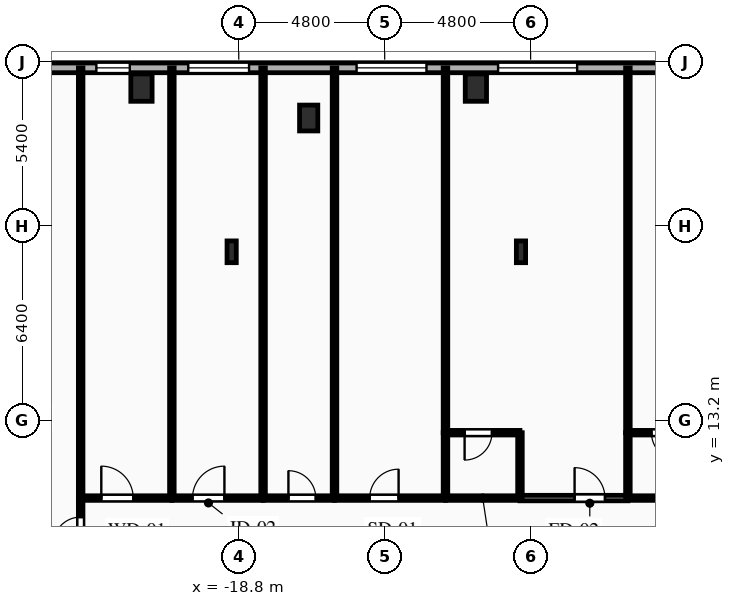
"""IFC4 building model, lengths in metres.
Left out: names, types, materials, properties, quantities, classifications, styles, units other than length and angle.
Written with IfcOpenShell. Run it as: python <this file> out.ifc"""

import sys

from ifc_helpers import new_model, si_unit, direction, frame, frame_2d, origin, origin_2d, place, context, subcontext, project, spatial, rectangle, i_section, extrude, element, fill, save


model = new_model("IFC4")
c1 = context("Model", 3, precision=1e-05, world=origin(), true_north=direction((0.0, 1.0)))
c2 = subcontext(c1, "Body", "Model", "MODEL_VIEW")
j1 = project(units=[si_unit("LENGTHUNIT", "METRE"), si_unit("PLANEANGLEUNIT", "RADIAN")], contexts=[c1])
p1 = place(None, origin())
s1 = spatial("IfcSite", under=j1, at=p1, CompositionType="ELEMENT")
p2 = place(p1, origin())
s2 = spatial("IfcBuilding", under=s1, at=p2, CompositionType="ELEMENT")
p3 = place(p2, frame((0.0, 0.0, 22.5)))
s3 = spatial("IfcBuildingStorey", under=s2, at=p3, CompositionType="ELEMENT", Elevation=22.5)
for number, where, z_axis, x_axis in (
    (1, (-22.0, 24.15, 0.0), (0.0, 0.0, 1.0), (1.0, 0.0, 0.0)),
    (2, (-11.0, 24.15, 0.0), (0.0, 0.0, 1.0), (1.0, 0.0, 0.0)),
):
    element("IfcColumn", number, at=place(p3, frame(where, z_axis=z_axis, x_axis=x_axis)), inside=s3, PredefinedType="COLUMN", context=c2, shape_type="SweptSolid", body=[
        extrude(rectangle(XDim=0.7, YDim=0.9, at=origin_2d()), origin(), (0.0, 0.0, 1.0), 4.5),
    ])
p4 = place(p3, frame((-16.5, 23.15, 0.0), z_axis=(0.0, 0.0, 1.0), x_axis=(1.0, 0.0, 0.0)))
e3 = element("IfcColumn", 3, at=p4, inside=s3, PredefinedType="PILASTER", context=c2, shape_type="SweptSolid", body=[
    extrude(rectangle(XDim=0.6, YDim=0.85, at=origin_2d()), origin(), (0.0, 0.0, 1.0), 4.5),
])
for number, where, z_axis, x_axis in (
    (4, (-9.517, 18.75, 0.0), (0.0, 0.0, 1.0), (1.0, 0.0, 0.0)),
    (5, (-19.033, 18.75, 0.0), (0.0, 0.0, 1.0), (1.0, 0.0, 0.0)),
):
    element("IfcColumn", number, at=place(p3, frame(where, z_axis=z_axis, x_axis=x_axis)), inside=s3, PredefinedType="COLUMN", context=c2, shape_type="SweptSolid", body=[
        extrude(i_section(OverallWidth=0.304, OverallDepth=0.716, WebThickness=0.021, FlangeThickness=0.04, FilletRadius=0.027, at=origin_2d()), origin(), (0.0, 0.0, 1.0), 4.5),
    ])
p5 = place(p3, frame((-36.8, 24.8, 0.0), z_axis=(0.0, 0.0, 1.0), x_axis=(1.0, 0.0, 0.0)))
e6 = element("IfcWall", 6, at=p5, inside=s3, PredefinedType="SOLIDWALL", context=c2, shape_type="SweptSolid", body=[
    extrude(rectangle(XDim=73.6, YDim=0.32, at=frame_2d((36.8, 0.0))), origin(), (0.0, 0.0, 1.0), 4.16),
])
p6 = place(p5, frame((1.079, 0.0, 0.85)))
e7 = element("IfcOpeningElement", 7, at=p6, cuts=e6, PredefinedType="OPENING", context=c2, shape_type="SweptSolid", body=[
    extrude(rectangle(XDim=2.3, YDim=2.4, at=frame_2d((1.15, 1.2))), frame((0.0, 0.17, 0.0), z_axis=(0.0, -1.0, 0.0), x_axis=(1.0, 0.0, 0.0)), (0.0, 0.0, 1.0), 0.34),
])
p7 = place(p5, frame((8.431, 0.0, 0.85)))
e8 = element("IfcOpeningElement", 8, at=p7, cuts=e6, PredefinedType="OPENING", context=c2, shape_type="SweptSolid", body=[
    extrude(rectangle(XDim=2.6, YDim=2.4, at=frame_2d((1.3, 1.2))), frame((0.0, 0.17, 0.0), z_axis=(0.0, -1.0, 0.0), x_axis=(1.0, 0.0, 0.0)), (0.0, 0.0, 1.0), 0.34),
])
p8 = place(p5, frame((13.316, 0.0, 0.85)))
e9 = element("IfcOpeningElement", 9, at=p8, cuts=e6, PredefinedType="OPENING", context=c2, shape_type="SweptSolid", body=[
    extrude(rectangle(XDim=1.1, YDim=1.85, at=frame_2d((0.55, 0.925))), frame((0.0, 0.17, 0.0), z_axis=(0.0, -1.0, 0.0), x_axis=(1.0, 0.0, 0.0)), (0.0, 0.0, 1.0), 0.34),
])
p9 = place(p5, frame((16.339, 0.0, 0.85)))
e10 = element("IfcOpeningElement", 10, at=p9, cuts=e6, PredefinedType="OPENING", context=c2, shape_type="SweptSolid", body=[
    extrude(rectangle(XDim=2.0, YDim=2.4, at=frame_2d((1.0, 1.2))), frame((0.0, 0.17, 0.0), z_axis=(0.0, -1.0, 0.0), x_axis=(1.0, 0.0, 0.0)), (0.0, 0.0, 1.0), 0.34),
])
p10 = place(p5, frame((21.875, 0.0, 0.85)))
e11 = element("IfcOpeningElement", 11, at=p10, cuts=e6, PredefinedType="OPENING", context=c2, shape_type="SweptSolid", body=[
    extrude(rectangle(XDim=2.3, YDim=2.4, at=frame_2d((1.15, 1.2))), frame((0.0, 0.17, 0.0), z_axis=(0.0, -1.0, 0.0), x_axis=(1.0, 0.0, 0.0)), (0.0, 0.0, 1.0), 0.34),
])
p11 = place(p5, frame((26.53, 0.0, 0.85)))
e12 = element("IfcOpeningElement", 12, at=p11, cuts=e6, PredefinedType="OPENING", context=c2, shape_type="SweptSolid", body=[
    extrude(rectangle(XDim=2.6, YDim=2.4, at=frame_2d((1.3, 1.2))), frame((0.0, 0.17, 0.0), z_axis=(0.0, -1.0, 0.0), x_axis=(1.0, 0.0, 0.0)), (0.0, 0.0, 1.0), 0.34),
])
p12 = place(p5, frame((32.537, 0.0, 0.85)))
e13 = element("IfcOpeningElement", 13, at=p12, cuts=e6, PredefinedType="OPENING", context=c2, shape_type="SweptSolid", body=[
    extrude(rectangle(XDim=2.6, YDim=2.4, at=frame_2d((1.3, 1.2))), frame((0.0, 0.17, 0.0), z_axis=(0.0, -1.0, 0.0), x_axis=(1.0, 0.0, 0.0)), (0.0, 0.0, 1.0), 0.34),
])
p13 = place(p5, frame((38.543, 0.0, 0.85)))
e14 = element("IfcOpeningElement", 14, at=p13, cuts=e6, PredefinedType="OPENING", context=c2, shape_type="SweptSolid", body=[
    extrude(rectangle(XDim=2.6, YDim=2.4, at=frame_2d((1.3, 1.2))), frame((0.0, 0.17, 0.0), z_axis=(0.0, -1.0, 0.0), x_axis=(1.0, 0.0, 0.0)), (0.0, 0.0, 1.0), 0.34),
])
p14 = place(p5, frame((44.55, 0.0, 0.85)))
e15 = element("IfcOpeningElement", 15, at=p14, cuts=e6, PredefinedType="OPENING", context=c2, shape_type="SweptSolid", body=[
    extrude(rectangle(XDim=2.6, YDim=2.4, at=frame_2d((1.3, 1.2))), frame((0.0, 0.17, 0.0), z_axis=(0.0, -1.0, 0.0), x_axis=(1.0, 0.0, 0.0)), (0.0, 0.0, 1.0), 0.34),
])
p15 = place(p5, frame((50.556, 0.0, 0.85)))
e16 = element("IfcOpeningElement", 16, at=p15, cuts=e6, PredefinedType="OPENING", context=c2, shape_type="SweptSolid", body=[
    extrude(rectangle(XDim=2.6, YDim=2.4, at=frame_2d((1.3, 1.2))), frame((0.0, 0.17, 0.0), z_axis=(0.0, -1.0, 0.0), x_axis=(1.0, 0.0, 0.0)), (0.0, 0.0, 1.0), 0.34),
])
p16 = place(p5, frame((55.341, 0.0, 0.85)))
e17 = element("IfcOpeningElement", 17, at=p16, cuts=e6, PredefinedType="OPENING", context=c2, shape_type="SweptSolid", body=[
    extrude(rectangle(XDim=2.0, YDim=2.4, at=frame_2d((1.0, 1.2))), frame((0.0, 0.17, 0.0), z_axis=(0.0, -1.0, 0.0), x_axis=(1.0, 0.0, 0.0)), (0.0, 0.0, 1.0), 0.34),
])
p17 = place(p5, frame((59.16, 0.0, 0.85)))
e18 = element("IfcOpeningElement", 18, at=p17, cuts=e6, PredefinedType="OPENING", context=c2, shape_type="SweptSolid", body=[
    extrude(rectangle(XDim=1.1, YDim=1.85, at=frame_2d((0.55, 0.925))), frame((0.0, 0.17, 0.0), z_axis=(0.0, -1.0, 0.0), x_axis=(1.0, 0.0, 0.0)), (0.0, 0.0, 1.0), 0.34),
])
p18 = place(p5, frame((62.649, 0.0, 0.85)))
e19 = element("IfcOpeningElement", 19, at=p18, cuts=e6, PredefinedType="OPENING", context=c2, shape_type="SweptSolid", body=[
    extrude(rectangle(XDim=2.6, YDim=2.4, at=frame_2d((1.3, 1.2))), frame((0.0, 0.17, 0.0), z_axis=(0.0, -1.0, 0.0), x_axis=(1.0, 0.0, 0.0)), (0.0, 0.0, 1.0), 0.34),
])
p19 = place(p5, frame((70.301, 0.0, 0.85)))
e20 = element("IfcOpeningElement", 20, at=p19, cuts=e6, PredefinedType="OPENING", context=c2, shape_type="SweptSolid", body=[
    extrude(rectangle(XDim=2.3, YDim=2.4, at=frame_2d((1.15, 1.2))), frame((0.0, 0.17, 0.0), z_axis=(0.0, -1.0, 0.0), x_axis=(1.0, 0.0, 0.0)), (0.0, 0.0, 1.0), 0.34),
])
p20 = place(p3, frame((-24.0, 8.5, 0.0), z_axis=(0.0, 0.0, 1.0), x_axis=(0.0, 1.0, 0.0)))
e21 = element("IfcWall", 21, at=p20, inside=s3, PredefinedType="PARTITIONING", context=c2, shape_type="SweptSolid", body=[
    extrude(rectangle(XDim=2.15, YDim=0.15, at=frame_2d((1.075, 0.0))), origin(), (0.0, 0.0, 1.0), 4.16),
])
p21 = place(p20, frame((0.625, 0.0, 0.0)))
e22 = element("IfcOpeningElement", 22, at=p21, cuts=e21, PredefinedType="OPENING", context=c2, shape_type="SweptSolid", body=[
    extrude(rectangle(XDim=0.9, YDim=2.1, at=frame_2d((0.45, 1.05))), frame((0.0, 0.085, 0.0), z_axis=(0.0, -1.0, 0.0), x_axis=(1.0, 0.0, 0.0)), (0.0, 0.0, 1.0), 0.17),
])
p22 = place(p3, frame((-24.0, 10.65, 0.0), z_axis=(0.0, 0.0, 1.0), x_axis=(1.0, 0.0, 0.0)))
e23 = element("IfcWall", 23, at=p22, inside=s3, PredefinedType="PARTITIONING", context=c2, shape_type="SweptSolid", body=[
    extrude(rectangle(XDim=3.0, YDim=0.15, at=frame_2d((1.5, 0.0))), origin(), (0.0, 0.0, 1.0), 4.16),
])
p23 = place(p22, frame((0.679, 0.0, 0.0)))
e24 = element("IfcOpeningElement", 24, at=p23, cuts=e23, PredefinedType="OPENING", context=c2, shape_type="SweptSolid", body=[
    extrude(rectangle(XDim=1.05, YDim=2.15, at=frame_2d((0.525, 1.075))), frame((0.0, 0.085, 0.0), z_axis=(0.0, -1.0, 0.0), x_axis=(1.0, 0.0, 0.0)), (0.0, 0.0, 1.0), 0.17),
])
p24 = place(p3, frame((-21.0, 10.65, 0.0), z_axis=(0.0, 0.0, 1.0), x_axis=(1.0, 0.0, 0.0)))
e25 = element("IfcWall", 25, at=p24, inside=s3, PredefinedType="PARTITIONING", context=c2, shape_type="SweptSolid", body=[
    extrude(rectangle(XDim=3.0, YDim=0.15, at=frame_2d((1.5, 0.0))), origin(), (0.0, 0.0, 1.0), 4.16),
])
p25 = place(p24, frame((0.679, 0.0, 0.0)))
e26 = element("IfcOpeningElement", 26, at=p25, cuts=e25, PredefinedType="OPENING", context=c2, shape_type="SweptSolid", body=[
    extrude(rectangle(XDim=1.05, YDim=2.15, at=frame_2d((0.525, 1.075))), frame((0.0, 0.085, 0.0), z_axis=(0.0, -1.0, 0.0), x_axis=(1.0, 0.0, 0.0)), (0.0, 0.0, 1.0), 0.17),
])
p26 = place(p3, frame((-18.0, 10.65, 0.0), z_axis=(0.0, 0.0, 1.0), x_axis=(1.0, 0.0, 0.0)))
e27 = element("IfcWall", 27, at=p26, inside=s3, PredefinedType="PLUMBINGWALL", context=c2, shape_type="SweptSolid", body=[
    extrude(rectangle(XDim=2.35, YDim=0.15, at=frame_2d((1.175, 0.0))), origin(), (0.0, 0.0, 1.0), 4.16),
])
p27 = place(p26, frame((0.834, 0.0, 0.0)))
e28 = element("IfcOpeningElement", 28, at=p27, cuts=e27, PredefinedType="OPENING", context=c2, shape_type="SweptSolid", body=[
    extrude(rectangle(XDim=0.9, YDim=2.1, at=frame_2d((0.45, 1.05))), frame((0.0, 0.085, 0.0), z_axis=(0.0, -1.0, 0.0), x_axis=(1.0, 0.0, 0.0)), (0.0, 0.0, 1.0), 0.17),
])
p28 = place(p3, frame((-15.65, 10.65, 0.0), z_axis=(0.0, 0.0, 1.0), x_axis=(1.0, 0.0, 0.0)))
e29 = element("IfcWall", 29, at=p28, inside=s3, PredefinedType="PARTITIONING", context=c2, shape_type="SweptSolid", body=[
    extrude(rectangle(XDim=3.65, YDim=0.15, at=frame_2d((1.825, 0.0))), origin(), (0.0, 0.0, 1.0), 4.16),
])
p29 = place(p28, frame((1.157, 0.0, 0.0)))
e30 = element("IfcOpeningElement", 30, at=p29, cuts=e29, PredefinedType="OPENING", context=c2, shape_type="SweptSolid", body=[
    extrude(rectangle(XDim=0.95, YDim=2.1, at=frame_2d((0.475, 1.05))), frame((0.0, 0.085, 0.0), z_axis=(0.0, -1.0, 0.0), x_axis=(1.0, 0.0, 0.0)), (0.0, 0.0, 1.0), 0.17),
])
p30 = place(p3, frame((-9.55, 10.65, 0.0), z_axis=(0.0, 0.0, 1.0), x_axis=(1.0, 0.0, 0.0)))
e31 = element("IfcWall", 31, at=p30, inside=s3, PredefinedType="PARTITIONING", context=c2, shape_type="SweptSolid", body=[
    extrude(rectangle(XDim=3.55, YDim=0.18, at=frame_2d((1.775, 0.0))), origin(), (0.0, 0.0, 1.0), 4.16),
])
p31 = place(p30, frame((1.796, 0.0, 0.0)))
e32 = element("IfcOpeningElement", 32, at=p31, cuts=e31, PredefinedType="OPENING", context=c2, shape_type="SweptSolid", body=[
    extrude(rectangle(XDim=1.0, YDim=2.15, at=frame_2d((0.5, 1.075))), frame((0.0, 0.1, 0.0), z_axis=(0.0, -1.0, 0.0), x_axis=(1.0, 0.0, 0.0)), (0.0, 0.0, 1.0), 0.2),
])
for number, where, z_axis, x_axis in (
    (33, (-12.0, 10.65, 0.0), (0.0, 0.0, 1.0), (1.0, 0.0, 0.0)),
    (34, (-6.0, 10.65, 0.0), (0.0, 0.0, 1.0), (1.0, 0.0, 0.0)),
):
    element("IfcWall", number, at=place(p3, frame(where, z_axis=z_axis, x_axis=x_axis)), inside=s3, PredefinedType="PLUMBINGWALL", context=c2, shape_type="SweptSolid", body=[
        extrude(rectangle(XDim=2.45, YDim=0.15, at=frame_2d((1.225, 0.0))), origin(), (0.0, 0.0, 1.0), 4.16),
    ])
for number, where, z_axis, x_axis in (
    (35, (-24.0, 24.8, 0.0), (0.0, 0.0, 1.0), (0.0, -1.0, 0.0)),
    (36, (-21.0, 24.8, 0.0), (0.0, 0.0, 1.0), (0.0, -1.0, 0.0)),
):
    element("IfcWall", number, at=place(p3, frame(where, z_axis=z_axis, x_axis=x_axis)), inside=s3, PredefinedType="PARTITIONING", context=c2, shape_type="SweptSolid", body=[
        extrude(rectangle(XDim=14.15, YDim=0.15, at=frame_2d((7.075, 0.0))), origin(), (0.0, 0.0, 1.0), 4.16),
    ])
for number, where, z_axis, x_axis in (
    (37, (-18.0, 24.8, 0.0), (0.0, 0.0, 1.0), (0.0, -1.0, 0.0)),
    (38, (-15.65, 24.8, 0.0), (0.0, 0.0, 1.0), (0.0, -1.0, 0.0)),
):
    element("IfcWall", number, at=place(p3, frame(where, z_axis=z_axis, x_axis=x_axis)), inside=s3, PredefinedType="PLUMBINGWALL", context=c2, shape_type="SweptSolid", body=[
        extrude(rectangle(XDim=14.15, YDim=0.15, at=frame_2d((7.075, 0.0))), origin(), (0.0, 0.0, 1.0), 4.16),
    ])
p32 = place(p3, frame((-12.0, 24.8, 0.0), z_axis=(0.0, 0.0, 1.0), x_axis=(0.0, -1.0, 0.0)))
e39 = element("IfcWall", 39, at=p32, inside=s3, PredefinedType="PARTITIONING", context=c2, shape_type="SweptSolid", body=[
    extrude(rectangle(XDim=12.0, YDim=0.15, at=frame_2d((6.0, 0.0))), origin(), (0.0, 0.0, 1.0), 4.16),
])
p33 = place(p3, frame((-12.0, 12.8, 0.0), z_axis=(0.0, 0.0, 1.0), x_axis=(0.0, -1.0, 0.0)))
e40 = element("IfcWall", 40, at=p33, inside=s3, PredefinedType="PLUMBINGWALL", context=c2, shape_type="SweptSolid", body=[
    extrude(rectangle(XDim=2.15, YDim=0.15, at=frame_2d((1.075, 0.0))), origin(), (0.0, 0.0, 1.0), 4.16),
])
p34 = place(p3, frame((-9.55, 12.8, 0.0), z_axis=(0.0, 0.0, 1.0), x_axis=(-1.0, 0.0, 0.0)))
e41 = element("IfcWall", 41, at=p34, inside=s3, PredefinedType="PLUMBINGWALL", context=c2, shape_type="SweptSolid", body=[
    extrude(rectangle(XDim=2.45, YDim=0.15, at=frame_2d((1.225, 0.0))), origin(), (0.0, 0.0, 1.0), 4.16),
])
p35 = place(p34, frame((0.921, 0.0, 0.0)))
e42 = element("IfcOpeningElement", 42, at=p35, cuts=e41, PredefinedType="OPENING", context=c2, shape_type="SweptSolid", body=[
    extrude(rectangle(XDim=0.9, YDim=2.1, at=frame_2d((0.45, 1.05))), frame((0.0, 0.085, 0.0), z_axis=(0.0, -1.0, 0.0), x_axis=(1.0, 0.0, 0.0)), (0.0, 0.0, 1.0), 0.17),
])
p36 = place(p3, frame((-9.55, 10.65, 0.0), z_axis=(0.0, 0.0, 1.0), x_axis=(0.0, 1.0, 0.0)))
e43 = element("IfcWall", 43, at=p36, inside=s3, PredefinedType="PLUMBINGWALL", context=c2, shape_type="SweptSolid", body=[
    extrude(rectangle(XDim=2.15, YDim=0.15, at=frame_2d((1.075, 0.0))), origin(), (0.0, 0.0, 1.0), 3.645),
])
p37 = place(p3, frame((-6.0, 24.8, 0.0), z_axis=(0.0, 0.0, 1.0), x_axis=(0.0, -1.0, 0.0)))
e44 = element("IfcWall", 44, at=p37, inside=s3, PredefinedType="PARTITIONING", context=c2, shape_type="SweptSolid", body=[
    extrude(rectangle(XDim=12.0, YDim=0.15, at=frame_2d((6.0, 0.0))), origin(), (0.0, 0.0, 1.0), 4.16),
])
p38 = place(p3, frame((-6.0, 12.8, 0.0), z_axis=(0.0, 0.0, 1.0), x_axis=(0.0, -1.0, 0.0)))
e45 = element("IfcWall", 45, at=p38, inside=s3, PredefinedType="PLUMBINGWALL", context=c2, shape_type="SweptSolid", body=[
    extrude(rectangle(XDim=2.15, YDim=0.15, at=frame_2d((1.075, 0.0))), origin(), (0.0, 0.0, 1.0), 4.16),
])
p39 = place(p3, frame((-3.55, 12.8, 0.0), z_axis=(0.0, 0.0, 1.0), x_axis=(-1.0, 0.0, 0.0)))
e46 = element("IfcWall", 46, at=p39, inside=s3, PredefinedType="PLUMBINGWALL", context=c2, shape_type="SweptSolid", body=[
    extrude(rectangle(XDim=2.45, YDim=0.15, at=frame_2d((1.225, 0.0))), origin(), (0.0, 0.0, 1.0), 4.16),
])
p40 = place(p39, frame((0.775, 0.0, 0.0)))
e47 = element("IfcOpeningElement", 47, at=p40, cuts=e46, PredefinedType="OPENING", context=c2, shape_type="SweptSolid", body=[
    extrude(rectangle(XDim=0.9, YDim=2.1, at=frame_2d((0.45, 1.05))), frame((0.0, 0.085, 0.0), z_axis=(0.0, -1.0, 0.0), x_axis=(1.0, 0.0, 0.0)), (0.0, 0.0, 1.0), 0.17),
])
p41 = place(p8, origin())
e48 = element("IfcWindow", 48, at=p41, inside=s3, PartitioningType="SINGLE_PANEL", PredefinedType="WINDOW", context=c2, shape_type="SweptSolid", body=[
    extrude(rectangle(XDim=1.1, YDim=1.85, at=frame_2d((0.55, 0.925))), frame((0.0, 0.03, 0.0), z_axis=(0.0, -1.0, 0.0), x_axis=(1.0, 0.0, 0.0)), (0.0, 0.0, 1.0), 0.06),
])
fill(e9, e48)
p42 = place(p9, origin())
e49 = element("IfcWindow", 49, at=p42, inside=s3, PartitioningType="SINGLE_PANEL", PredefinedType="WINDOW", context=c2, shape_type="SweptSolid", body=[
    extrude(rectangle(XDim=2.0, YDim=2.4, at=frame_2d((1.0, 1.2))), frame((0.0, 0.03, 0.0), z_axis=(0.0, -1.0, 0.0), x_axis=(1.0, 0.0, 0.0)), (0.0, 0.0, 1.0), 0.06),
])
fill(e10, e49)
p43 = place(p10, origin())
e50 = element("IfcWindow", 50, at=p43, inside=s3, PartitioningType="SINGLE_PANEL", PredefinedType="WINDOW", context=c2, shape_type="SweptSolid", body=[
    extrude(rectangle(XDim=2.3, YDim=2.4, at=frame_2d((1.15, 1.2))), frame((0.0, 0.03, 0.0), z_axis=(0.0, -1.0, 0.0), x_axis=(1.0, 0.0, 0.0)), (0.0, 0.0, 1.0), 0.06),
])
fill(e11, e50)
p44 = place(p11, origin())
e51 = element("IfcWindow", 51, at=p44, inside=s3, PartitioningType="SINGLE_PANEL", PredefinedType="WINDOW", context=c2, shape_type="SweptSolid", body=[
    extrude(rectangle(XDim=2.6, YDim=2.4, at=frame_2d((1.3, 1.2))), frame((0.0, 0.03, 0.0), z_axis=(0.0, -1.0, 0.0), x_axis=(1.0, 0.0, 0.0)), (0.0, 0.0, 1.0), 0.06),
])
fill(e12, e51)
p45 = place(p21, origin())
e52 = element("IfcDoor", 52, at=p45, inside=s3, OperationType="SINGLE_SWING_LEFT", PredefinedType="DOOR", context=c2, shape_type="SweptSolid", body=[
    extrude(rectangle(XDim=0.9, YDim=2.1, at=frame_2d((0.45, 1.05))), frame((0.0, 0.025, 0.0), z_axis=(0.0, -1.0, 0.0), x_axis=(1.0, 0.0, 0.0)), (0.0, 0.0, 1.0), 0.05),
])
fill(e22, e52)
p46 = place(p23, origin())
e53 = element("IfcDoor", 53, at=p46, inside=s3, OperationType="SINGLE_SWING_LEFT", PredefinedType="DOOR", context=c2, shape_type="SweptSolid", body=[
    extrude(rectangle(XDim=1.05, YDim=2.15, at=frame_2d((0.525, 1.075))), frame((0.0, 0.025, 0.0), z_axis=(0.0, -1.0, 0.0), x_axis=(1.0, 0.0, 0.0)), (0.0, 0.0, 1.0), 0.05),
])
fill(e24, e53)
p47 = place(p25, origin())
e54 = element("IfcDoor", 54, at=p47, inside=s3, OperationType="SINGLE_SWING_RIGHT", PredefinedType="DOOR", context=c2, shape_type="SweptSolid", body=[
    extrude(rectangle(XDim=1.05, YDim=2.15, at=frame_2d((0.525, 1.075))), frame((0.0, 0.025, 0.0), z_axis=(0.0, -1.0, 0.0), x_axis=(1.0, 0.0, 0.0)), (0.0, 0.0, 1.0), 0.05),
])
fill(e26, e54)
p48 = place(p27, origin())
e55 = element("IfcDoor", 55, at=p48, inside=s3, OperationType="SINGLE_SWING_LEFT", PredefinedType="DOOR", context=c2, shape_type="SweptSolid", body=[
    extrude(rectangle(XDim=0.9, YDim=2.1, at=frame_2d((0.45, 1.05))), frame((0.0, 0.025, 0.0), z_axis=(0.0, -1.0, 0.0), x_axis=(1.0, 0.0, 0.0)), (0.0, 0.0, 1.0), 0.05),
])
fill(e28, e55)
p49 = place(p29, origin())
e56 = element("IfcDoor", 56, at=p49, inside=s3, OperationType="SINGLE_SWING_RIGHT", PredefinedType="DOOR", context=c2, shape_type="SweptSolid", body=[
    extrude(rectangle(XDim=0.95, YDim=2.1, at=frame_2d((0.475, 1.05))), frame((0.0, 0.025, 0.0), z_axis=(0.0, -1.0, 0.0), x_axis=(1.0, 0.0, 0.0)), (0.0, 0.0, 1.0), 0.05),
])
fill(e30, e56)
p50 = place(p31, origin())
e57 = element("IfcDoor", 57, at=p50, inside=s3, OperationType="SINGLE_SWING_LEFT", PredefinedType="DOOR", context=c2, shape_type="SweptSolid", body=[
    extrude(rectangle(XDim=1.0, YDim=2.15, at=frame_2d((0.5, 1.075))), frame((0.0, 0.025, 0.0), z_axis=(0.0, -1.0, 0.0), x_axis=(1.0, 0.0, 0.0)), (0.0, 0.0, 1.0), 0.05),
])
fill(e32, e57)
p51 = place(p35, origin())
e58 = element("IfcDoor", 58, at=p51, inside=s3, OperationType="SINGLE_SWING_RIGHT", PredefinedType="DOOR", context=c2, shape_type="SweptSolid", body=[
    extrude(rectangle(XDim=0.9, YDim=2.1, at=frame_2d((0.45, 1.05))), frame((0.0, 0.025, 0.0), z_axis=(0.0, -1.0, 0.0), x_axis=(1.0, 0.0, 0.0)), (0.0, 0.0, 1.0), 0.05),
])
fill(e42, e58)
p52 = place(p40, origin())
e59 = element("IfcDoor", 59, at=p52, inside=s3, OperationType="SINGLE_SWING_LEFT", PredefinedType="DOOR", context=c2, shape_type="SweptSolid", body=[
    extrude(rectangle(XDim=0.9, YDim=2.1, at=frame_2d((0.45, 1.05))), frame((0.0, 0.025, 0.0), z_axis=(0.0, -1.0, 0.0), x_axis=(1.0, 0.0, 0.0)), (0.0, 0.0, 1.0), 0.05),
])
fill(e47, e59)
save(model, sys.argv[1])
